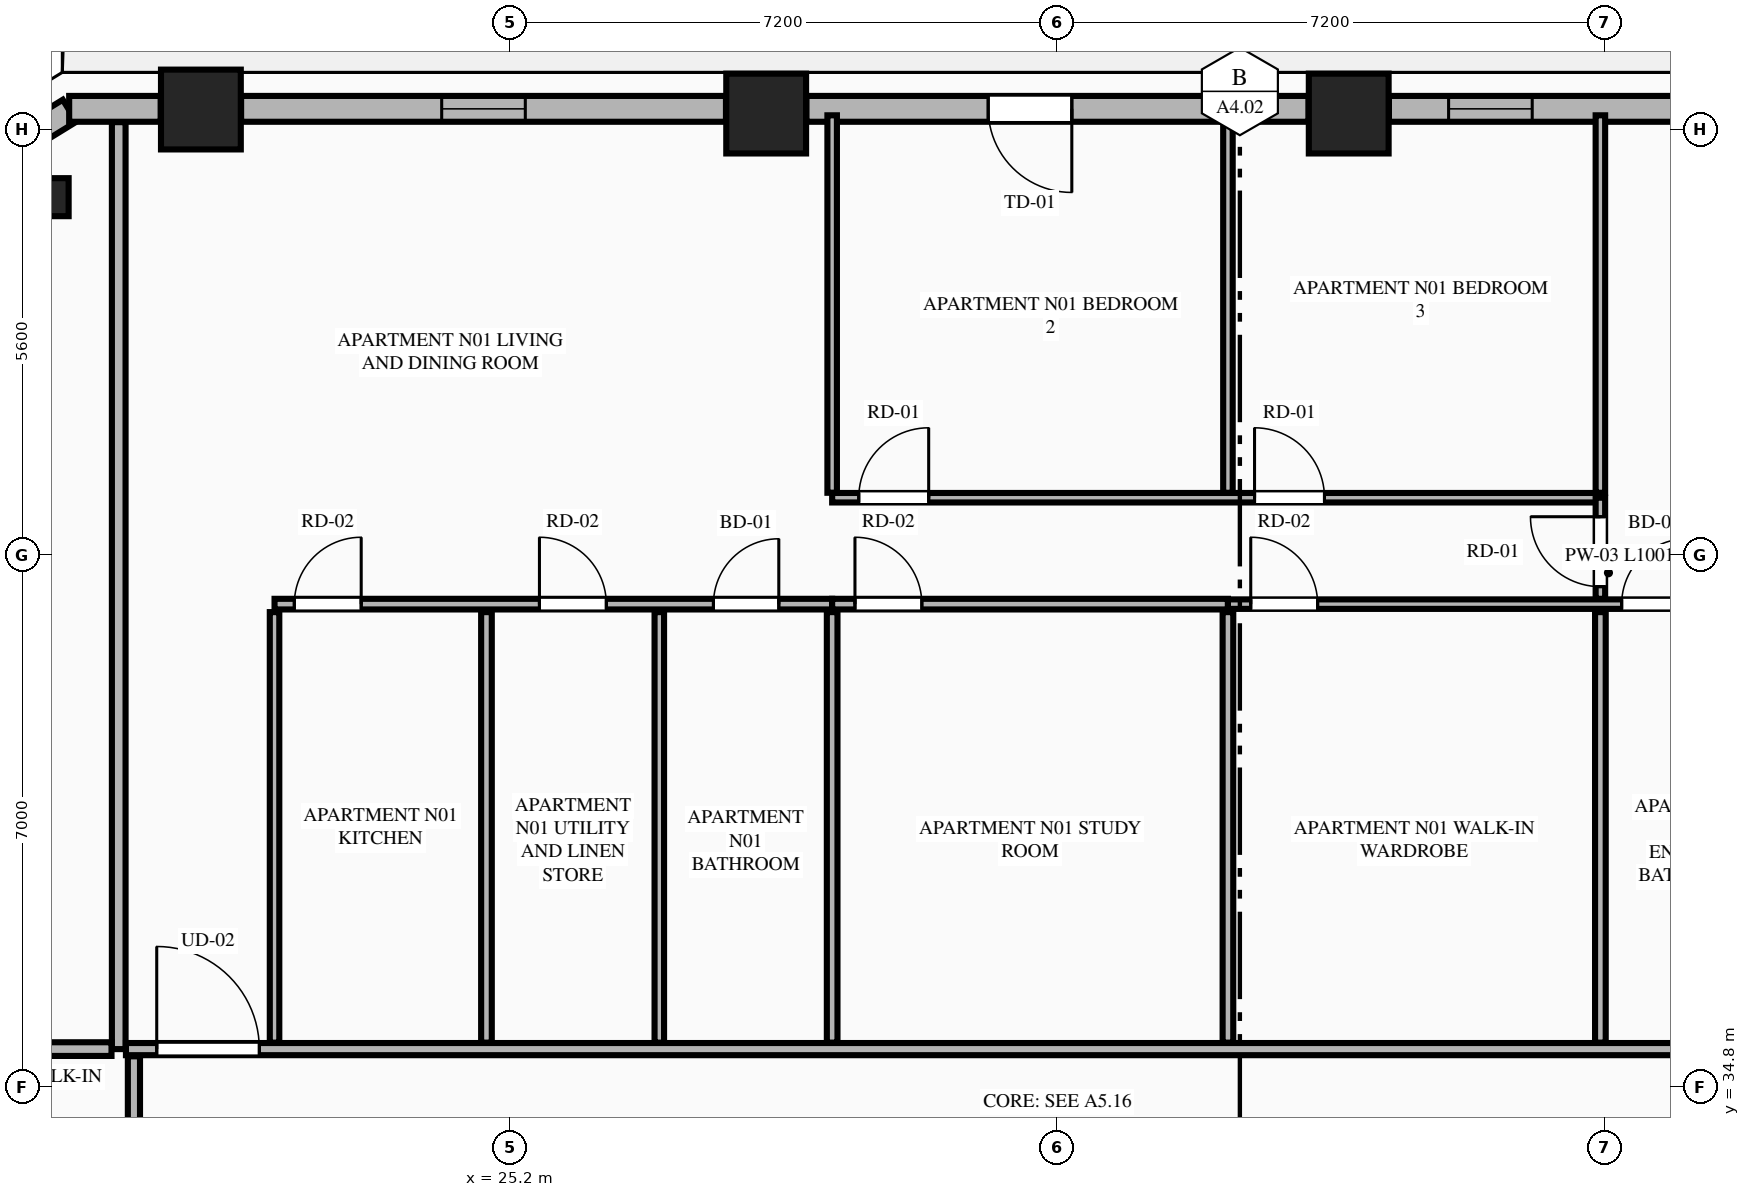
"""IFC4 building model, lengths in metres.
Left out: names, types, materials, properties, quantities, classifications, styles, units other than length and angle.
Written with IfcOpenShell. Run it as: python <this file> out.ifc"""

import sys

from ifc_helpers import new_model, si_unit, direction, frame, frame_2d, origin, origin_2d, place, context, subcontext, project, spatial, rectangle, extrude, element, fill, save


model = new_model("IFC4")
c1 = context("Model", 3, precision=1e-05, world=origin(), true_north=direction((0.0, 1.0)))
c2 = subcontext(c1, "Body", "Model", "MODEL_VIEW")
j1 = project(units=[si_unit("LENGTHUNIT", "METRE"), si_unit("PLANEANGLEUNIT", "RADIAN")], contexts=[c1])
p1 = place(None, origin())
s1 = spatial("IfcSite", under=j1, at=p1, CompositionType="ELEMENT")
p2 = place(p1, origin())
s2 = spatial("IfcBuilding", under=s1, at=p2, CompositionType="ELEMENT")
p3 = place(p2, frame((0.0, 0.0, 130.35)))
s3 = spatial("IfcBuildingStorey", under=s2, at=p3, CompositionType="ELEMENT", Elevation=130.35)
for number, where, z_axis, x_axis in (
    (1, (36.232, 47.608, 0.0), (0.0, 0.0, 1.0), (1.0, 0.0, 0.0)),
    (2, (28.568, 47.608, 0.0), (0.0, 0.0, 1.0), (1.0, 0.0, 0.0)),
    (3, (21.131, 47.661, 0.0), (0.0, 0.0, 1.0), (1.0, 0.0, 0.0)),
):
    element("IfcColumn", number, at=place(p3, frame(where, z_axis=z_axis, x_axis=x_axis)), inside=s3, PredefinedType="COLUMN", context=c2, shape_type="SweptSolid", body=[
        extrude(rectangle(XDim=1.05, YDim=1.05, at=origin_2d()), origin(), (0.0, 0.0, 1.0), 3.55),
    ])
p4 = place(p3, frame((19.141, 46.508, 0.0), z_axis=(0.0, 0.0, 1.0), x_axis=(-0.865160173452, -0.501495637342, 0.0)))
e4 = element("IfcColumn", 4, at=p4, inside=s3, PredefinedType="PILASTER", context=c2, shape_type="SweptSolid", body=[
    extrude(rectangle(XDim=0.5, YDim=0.35, at=origin_2d()), origin(), (0.0, 0.0, 1.0), 3.55),
])
p5 = place(p3, frame((19.403, 47.645, 0.0), z_axis=(0.0, 0.0, 1.0), x_axis=(-0.851798915137, -0.523868884523, 0.0)))
e5 = element("IfcWall", 5, at=p5, inside=s3, PredefinedType="STANDARD", context=c2, shape_type="SweptSolid", body=[
    extrude(rectangle(XDim=1.848, YDim=0.34, at=frame_2d((0.924, 0.0))), origin(), (0.0, 0.0, 1.0), 3.34),
])
p6 = place(p3, frame((43.14, 47.67, 0.0), z_axis=(0.0, 0.0, 1.0), x_axis=(-1.0, 0.0, 0.0)))
e6 = element("IfcWall", 6, at=p6, inside=s3, PredefinedType="STANDARD", context=c2, shape_type="SweptSolid", body=[
    extrude(rectangle(XDim=6.379, YDim=0.34, at=frame_2d((3.189, 0.0))), origin(), (0.0, 0.0, 1.0), 2.797),
])
p7 = place(p6, frame((1.192, 0.0, 0.75)))
e7 = element("IfcOpeningElement", 7, at=p7, cuts=e6, PredefinedType="OPENING", context=c2, shape_type="SweptSolid", body=[
    extrude(rectangle(XDim=1.1, YDim=1.897, at=frame_2d((0.55, 0.948))), frame((0.0, 0.18, 0.0), z_axis=(0.0, -1.0, 0.0), x_axis=(1.0, 0.0, 0.0)), (0.0, 0.0, 1.0), 0.36),
])
p8 = place(p6, frame((4.494, 0.0, 0.75)))
e8 = element("IfcOpeningElement", 8, at=p8, cuts=e6, PredefinedType="OPENING", context=c2, shape_type="SweptSolid", body=[
    extrude(rectangle(XDim=1.1, YDim=1.897, at=frame_2d((0.55, 0.948))), frame((0.0, 0.18, 0.0), z_axis=(0.0, -1.0, 0.0), x_axis=(1.0, 0.0, 0.0)), (0.0, 0.0, 1.0), 0.36),
])
p9 = place(p3, frame((35.703, 47.67, 0.0), z_axis=(0.0, 0.0, 1.0), x_axis=(-1.0, 0.0, 0.0)))
e9 = element("IfcWall", 9, at=p9, inside=s3, PredefinedType="STANDARD", context=c2, shape_type="SweptSolid", body=[
    extrude(rectangle(XDim=6.606, YDim=0.34, at=frame_2d((3.303, 0.0))), origin(), (0.0, 0.0, 1.0), 2.797),
])
p10 = place(p9, frame((3.114, 0.0, 0.0)))
e10 = element("IfcOpeningElement", 10, at=p10, cuts=e9, PredefinedType="OPENING", context=c2, shape_type="SweptSolid", body=[
    extrude(rectangle(XDim=1.1, YDim=2.25, at=frame_2d((0.55, 1.125))), frame((0.0, 0.18, 0.0), z_axis=(0.0, -1.0, 0.0), x_axis=(1.0, 0.0, 0.0)), (0.0, 0.0, 1.0), 0.36),
])
p11 = place(p3, frame((28.039, 47.67, 0.0), z_axis=(0.0, 0.0, 1.0), x_axis=(-1.0, 0.0, 0.0)))
e11 = element("IfcWall", 11, at=p11, inside=s3, PredefinedType="STANDARD", context=c2, shape_type="SweptSolid", body=[
    extrude(rectangle(XDim=6.379, YDim=0.34, at=frame_2d((3.189, 0.0))), origin(), (0.0, 0.0, 1.0), 2.797),
])
p12 = place(p11, frame((2.64, 0.0, 0.75)))
e12 = element("IfcOpeningElement", 12, at=p12, cuts=e11, PredefinedType="OPENING", context=c2, shape_type="SweptSolid", body=[
    extrude(rectangle(XDim=1.1, YDim=1.897, at=frame_2d((0.55, 0.948))), frame((0.0, 0.18, 0.0), z_axis=(0.0, -1.0, 0.0), x_axis=(1.0, 0.0, 0.0)), (0.0, 0.0, 1.0), 0.36),
])
p13 = place(p3, frame((20.602, 47.67, 0.0), z_axis=(0.0, 0.0, 1.0), x_axis=(-1.0, 0.0, 0.0)))
e13 = element("IfcWall", 13, at=p13, inside=s3, PredefinedType="STANDARD", context=c2, shape_type="SweptSolid", body=[
    extrude(rectangle(XDim=1.204, YDim=0.34, at=frame_2d((0.602, 0.0))), origin(), (0.0, 0.0, 1.0), 3.34),
])
p14 = place(p3, frame((20.05, 35.3, 0.0), z_axis=(0.0, 0.0, 1.0), x_axis=(0.0, 1.0, 0.0)))
e14 = element("IfcWall", 14, at=p14, inside=s3, PredefinedType="PARTITIONING", context=c2, shape_type="SweptSolid", body=[
    extrude(rectangle(XDim=12.195, YDim=0.18, at=frame_2d((6.098, 0.0))), origin(), (0.0, 0.0, 1.0), 3.34),
])
p15 = place(p3, frame((20.145, 35.3, 0.0), z_axis=(0.0, 0.0, 1.0), x_axis=(1.0, 0.0, 0.0)))
e15 = element("IfcWall", 15, at=p15, inside=s3, PredefinedType="PARTITIONING", context=c2, shape_type="SweptSolid", body=[
    extrude(rectangle(XDim=24.51, YDim=0.16, at=frame_2d((12.255, 0.0))), origin(), (0.0, 0.0, 1.0), 3.34),
])
p16 = place(p15, frame((0.405, 0.0, 0.0)))
e16 = element("IfcOpeningElement", 16, at=p16, cuts=e15, PredefinedType="OPENING", context=c2, shape_type="SweptSolid", body=[
    extrude(rectangle(XDim=1.35, YDim=2.35, at=frame_2d((0.675, 1.175))), frame((0.0, 0.09, 0.0), z_axis=(0.0, -1.0, 0.0), x_axis=(1.0, 0.0, 0.0)), (0.0, 0.0, 1.0), 0.18),
])
p17 = place(p3, frame((22.1, 35.385, 0.0), z_axis=(0.0, 0.0, 1.0), x_axis=(0.0, 1.0, 0.0)))
e17 = element("IfcWall", 17, at=p17, inside=s3, PredefinedType="PARTITIONING", context=c2, shape_type="SweptSolid", body=[
    extrude(rectangle(XDim=5.664, YDim=0.125, at=frame_2d((2.832, 0.0))), origin(), (0.0, 0.0, 1.0), 2.722),
])
p18 = place(p3, frame((22.1, 41.154, 0.0), z_axis=(0.0, 0.0, 1.0), x_axis=(1.0, 0.0, 0.0)))
e18 = element("IfcWall", 18, at=p18, inside=s3, PredefinedType="PLUMBINGWALL", context=c2, shape_type="SweptSolid", body=[
    extrude(rectangle(XDim=7.336, YDim=0.14, at=frame_2d((3.668, 0.0))), origin(), (0.0, 0.0, 1.0), 3.34),
])
p19 = place(p18, frame((5.774, 0.0, 0.0)))
e19 = element("IfcOpeningElement", 19, at=p19, cuts=e18, PredefinedType="OPENING", context=c2, shape_type="SweptSolid", body=[
    extrude(rectangle(XDim=0.86, YDim=2.1, at=frame_2d((0.43, 1.05))), frame((0.0, 0.08, 0.0), z_axis=(0.0, -1.0, 0.0), x_axis=(1.0, 0.0, 0.0)), (0.0, 0.0, 1.0), 0.16),
])
p20 = place(p18, frame((0.26, 0.0, 0.0)))
e20 = element("IfcOpeningElement", 20, at=p20, cuts=e18, PredefinedType="OPENING", context=c2, shape_type="SweptSolid", body=[
    extrude(rectangle(XDim=0.88, YDim=2.15, at=frame_2d((0.44, 1.075))), frame((0.0, 0.08, 0.0), z_axis=(0.0, -1.0, 0.0), x_axis=(1.0, 0.0, 0.0)), (0.0, 0.0, 1.0), 0.16),
])
p21 = place(p18, frame((3.485, 0.0, 0.0)))
e21 = element("IfcOpeningElement", 21, at=p21, cuts=e18, PredefinedType="OPENING", context=c2, shape_type="SweptSolid", body=[
    extrude(rectangle(XDim=0.88, YDim=2.15, at=frame_2d((0.44, 1.075))), frame((0.0, 0.08, 0.0), z_axis=(0.0, -1.0, 0.0), x_axis=(1.0, 0.0, 0.0)), (0.0, 0.0, 1.0), 0.16),
])
p22 = place(p3, frame((29.436, 41.154, 0.0), z_axis=(0.0, 0.0, 1.0), x_axis=(1.0, 0.0, 0.0)))
e22 = element("IfcWall", 22, at=p22, inside=s3, PredefinedType="PLUMBINGWALL", context=c2, shape_type="SweptSolid", body=[
    extrude(rectangle(XDim=5.207, YDim=0.14, at=frame_2d((2.604, 0.0))), origin(), (0.0, 0.0, 1.0), 3.34),
])
p23 = place(p22, frame((0.3, 0.0, 0.0)))
e23 = element("IfcOpeningElement", 23, at=p23, cuts=e22, PredefinedType="OPENING", context=c2, shape_type="SweptSolid", body=[
    extrude(rectangle(XDim=0.88, YDim=2.15, at=frame_2d((0.44, 1.075))), frame((0.0, 0.08, 0.0), z_axis=(0.0, -1.0, 0.0), x_axis=(1.0, 0.0, 0.0)), (0.0, 0.0, 1.0), 0.16),
])
p24 = place(p3, frame((34.643, 41.154, 0.0), z_axis=(0.0, 0.0, 1.0), x_axis=(1.0, 0.0, 0.0)))
e24 = element("IfcWall", 24, at=p24, inside=s3, PredefinedType="PARTITIONING", context=c2, shape_type="SweptSolid", body=[
    extrude(rectangle(XDim=10.012, YDim=0.125, at=frame_2d((5.006, 0.0))), origin(), (0.0, 0.0, 1.0), 3.34),
])
p25 = place(p24, frame((5.18, 0.0, 0.0)))
e25 = element("IfcOpeningElement", 25, at=p25, cuts=e24, PredefinedType="OPENING", context=c2, shape_type="SweptSolid", body=[
    extrude(rectangle(XDim=0.86, YDim=2.1, at=frame_2d((0.43, 1.05))), frame((0.0, 0.073, 0.0), z_axis=(0.0, -1.0, 0.0), x_axis=(1.0, 0.0, 0.0)), (0.0, 0.0, 1.0), 0.145),
])
p26 = place(p24, frame((7.604, 0.0, 0.0)))
e26 = element("IfcOpeningElement", 26, at=p26, cuts=e24, PredefinedType="OPENING", context=c2, shape_type="SweptSolid", body=[
    extrude(rectangle(XDim=0.88, YDim=2.15, at=frame_2d((0.44, 1.075))), frame((0.0, 0.073, 0.0), z_axis=(0.0, -1.0, 0.0), x_axis=(1.0, 0.0, 0.0)), (0.0, 0.0, 1.0), 0.145),
])
p27 = place(p24, frame((0.3, 0.0, 0.0)))
e27 = element("IfcOpeningElement", 27, at=p27, cuts=e24, PredefinedType="OPENING", context=c2, shape_type="SweptSolid", body=[
    extrude(rectangle(XDim=0.88, YDim=2.15, at=frame_2d((0.44, 1.075))), frame((0.0, 0.073, 0.0), z_axis=(0.0, -1.0, 0.0), x_axis=(1.0, 0.0, 0.0)), (0.0, 0.0, 1.0), 0.145),
])
p28 = place(p3, frame((24.888, 35.385, 0.0), z_axis=(0.0, 0.0, 1.0), x_axis=(0.0, 1.0, 0.0)))
e28 = element("IfcWall", 28, at=p28, inside=s3, PredefinedType="PLUMBINGWALL", context=c2, shape_type="SweptSolid", body=[
    extrude(rectangle(XDim=5.664, YDim=0.14, at=frame_2d((2.832, 0.0))), origin(), (0.0, 0.0, 1.0), 3.34),
])
p29 = place(p3, frame((27.162, 35.385, 0.0), z_axis=(0.0, 0.0, 1.0), x_axis=(0.0, 1.0, 0.0)))
e29 = element("IfcWall", 29, at=p29, inside=s3, PredefinedType="PARTITIONING", context=c2, shape_type="SweptSolid", body=[
    extrude(rectangle(XDim=5.664, YDim=0.125, at=frame_2d((2.832, 0.0))), origin(), (0.0, 0.0, 1.0), 3.34),
])
p30 = place(p3, frame((29.436, 42.619, 0.0), z_axis=(0.0, 0.0, 1.0), x_axis=(0.0, 1.0, 0.0)))
e30 = element("IfcWall", 30, at=p30, inside=s3, PredefinedType="PARTITIONING", context=c2, shape_type="SweptSolid", body=[
    extrude(rectangle(XDim=4.966, YDim=0.125, at=frame_2d((2.483, 0.0))), origin(), (0.0, 0.0, 1.0), 3.34),
])
p31 = place(p3, frame((29.436, 42.554, 0.0), z_axis=(0.0, 0.0, 1.0), x_axis=(1.0, 0.0, 0.0)))
e31 = element("IfcWall", 31, at=p31, inside=s3, PredefinedType="PARTITIONING", context=c2, shape_type="SweptSolid", body=[
    extrude(rectangle(XDim=10.107, YDim=0.125, at=frame_2d((5.053, 0.0))), origin(), (0.0, 0.0, 1.0), 2.975),
])
p32 = place(p31, frame((0.35, 0.0, 0.0)))
e32 = element("IfcOpeningElement", 32, at=p32, cuts=e31, PredefinedType="OPENING", context=c2, shape_type="SweptSolid", body=[
    extrude(rectangle(XDim=0.92, YDim=2.15, at=frame_2d((0.46, 1.075))), frame((0.0, 0.073, 0.0), z_axis=(0.0, -1.0, 0.0), x_axis=(1.0, 0.0, 0.0)), (0.0, 0.0, 1.0), 0.145),
])
p33 = place(p31, frame((5.557, 0.0, 0.0)))
e33 = element("IfcOpeningElement", 33, at=p33, cuts=e31, PredefinedType="OPENING", context=c2, shape_type="SweptSolid", body=[
    extrude(rectangle(XDim=0.92, YDim=2.15, at=frame_2d((0.46, 1.075))), frame((0.0, 0.073, 0.0), z_axis=(0.0, -1.0, 0.0), x_axis=(1.0, 0.0, 0.0)), (0.0, 0.0, 1.0), 0.145),
])
p34 = place(p3, frame((39.543, 41.224, 0.0), z_axis=(0.0, 0.0, 1.0), x_axis=(0.0, 1.0, 0.0)))
e34 = element("IfcWall", 34, at=p34, inside=s3, PredefinedType="PARTITIONING", context=c2, shape_type="SweptSolid", body=[
    extrude(rectangle(XDim=1.33, YDim=0.125, at=frame_2d((0.665, 0.0))), origin(), (0.0, 0.0, 1.0), 3.34),
])
p35 = place(p34, frame((0.16, 0.0, 0.0)))
e35 = element("IfcOpeningElement", 35, at=p35, cuts=e34, PredefinedType="OPENING", context=c2, shape_type="SweptSolid", body=[
    extrude(rectangle(XDim=0.92, YDim=2.15, at=frame_2d((0.46, 1.075))), frame((0.0, 0.073, 0.0), z_axis=(0.0, -1.0, 0.0), x_axis=(1.0, 0.0, 0.0)), (0.0, 0.0, 1.0), 0.145),
])
for number, where, z_axis, x_axis in (
    (36, (29.436, 35.385, 0.0), (0.0, 0.0, 1.0), (0.0, 1.0, 0.0)),
    (37, (34.643, 35.385, 0.0), (0.0, 0.0, 1.0), (0.0, 1.0, 0.0)),
):
    element("IfcWall", number, at=place(p3, frame(where, z_axis=z_axis, x_axis=x_axis)), inside=s3, PredefinedType="PLUMBINGWALL", context=c2, shape_type="SweptSolid", body=[
        extrude(rectangle(XDim=5.664, YDim=0.14, at=frame_2d((2.832, 0.0))), origin(), (0.0, 0.0, 1.0), 3.34),
    ])
for number, where, z_axis, x_axis in (
    (38, (34.643, 42.619, 0.0), (0.0, 0.0, 1.0), (0.0, 1.0, 0.0)),
    (39, (39.543, 42.619, 0.0), (0.0, 0.0, 1.0), (0.0, 1.0, 0.0)),
):
    element("IfcWall", number, at=place(p3, frame(where, z_axis=z_axis, x_axis=x_axis)), inside=s3, PredefinedType="PARTITIONING", context=c2, shape_type="SweptSolid", body=[
        extrude(rectangle(XDim=4.966, YDim=0.125, at=frame_2d((2.483, 0.0))), origin(), (0.0, 0.0, 1.0), 3.34),
    ])
p36 = place(p3, frame((39.543, 35.385, 0.0), z_axis=(0.0, 0.0, 1.0), x_axis=(0.0, 1.0, 0.0)))
e40 = element("IfcWall", 40, at=p36, inside=s3, PredefinedType="PLUMBINGWALL", context=c2, shape_type="SweptSolid", body=[
    extrude(rectangle(XDim=5.664, YDim=0.14, at=frame_2d((2.832, 0.0))), origin(), (0.0, 0.0, 1.0), 3.34),
])
p37 = place(p3, frame((12.286, 35.3, 0.0), z_axis=(0.0, 0.0, 1.0), x_axis=(1.0, 0.0, 0.0)))
e41 = element("IfcWall", 41, at=p37, inside=s3, PredefinedType="PARTITIONING", context=c2, shape_type="SweptSolid", body=[
    extrude(rectangle(XDim=7.669, YDim=0.18, at=frame_2d((3.834, 0.0))), origin(), (0.0, 0.0, 1.0), 3.34),
])
p38 = place(p3, frame((20.25, 16.595, 0.0), z_axis=(0.0, 0.0, 1.0), x_axis=(0.0, 1.0, 0.0)))
e42 = element("IfcWall", 42, at=p38, inside=s3, PredefinedType="PARTITIONING", context=c2, shape_type="SweptSolid", body=[
    extrude(rectangle(XDim=18.61, YDim=0.16, at=frame_2d((9.305, 0.0))), origin(), (0.0, 0.0, 1.0), 3.34),
])
p39 = place(p38, frame((0.45, 0.0, 0.0)))
e43 = element("IfcOpeningElement", 43, at=p39, cuts=e42, PredefinedType="OPENING", context=c2, shape_type="SweptSolid", body=[
    extrude(rectangle(XDim=1.02, YDim=2.25, at=frame_2d((0.51, 1.125))), frame((0.0, 0.09, 0.0), z_axis=(0.0, -1.0, 0.0), x_axis=(1.0, 0.0, 0.0)), (0.0, 0.0, 1.0), 0.18),
])
p40 = place(p10, origin())
e44 = element("IfcDoor", 44, at=p40, inside=s3, OperationType="SINGLE_SWING_LEFT", PredefinedType="DOOR", context=c2, shape_type="SweptSolid", body=[
    extrude(rectangle(XDim=1.1, YDim=2.25, at=frame_2d((0.55, 1.125))), frame((0.0, 0.025, 0.0), z_axis=(0.0, -1.0, 0.0), x_axis=(1.0, 0.0, 0.0)), (0.0, 0.0, 1.0), 0.05),
])
fill(e10, e44)
p41 = place(p12, origin())
e45 = element("IfcWindow", 45, at=p41, inside=s3, PartitioningType="SINGLE_PANEL", PredefinedType="WINDOW", context=c2, shape_type="SweptSolid", body=[
    extrude(rectangle(XDim=1.1, YDim=1.897, at=frame_2d((0.55, 0.948))), frame((0.0, 0.03, 0.0), z_axis=(0.0, -1.0, 0.0), x_axis=(1.0, 0.0, 0.0)), (0.0, 0.0, 1.0), 0.06),
])
fill(e12, e45)
p42 = place(p19, origin())
e46 = element("IfcDoor", 46, at=p42, inside=s3, OperationType="SINGLE_SWING_RIGHT", PredefinedType="DOOR", context=c2, shape_type="SweptSolid", body=[
    extrude(rectangle(XDim=0.86, YDim=2.1, at=frame_2d((0.43, 1.05))), frame((0.0, 0.025, 0.0), z_axis=(0.0, -1.0, 0.0), x_axis=(1.0, 0.0, 0.0)), (0.0, 0.0, 1.0), 0.05),
])
fill(e19, e46)
p43 = place(p25, origin())
e47 = element("IfcDoor", 47, at=p43, inside=s3, OperationType="SINGLE_SWING_RIGHT", PredefinedType="DOOR", context=c2, shape_type="SweptSolid", body=[
    extrude(rectangle(XDim=0.86, YDim=2.1, at=frame_2d((0.43, 1.05))), frame((0.0, 0.025, 0.0), z_axis=(0.0, -1.0, 0.0), x_axis=(1.0, 0.0, 0.0)), (0.0, 0.0, 1.0), 0.05),
])
fill(e25, e47)
p44 = place(p16, origin())
e48 = element("IfcDoor", 48, at=p44, inside=s3, OperationType="SINGLE_SWING_LEFT", PredefinedType="DOOR", context=c2, shape_type="SweptSolid", body=[
    extrude(rectangle(XDim=1.35, YDim=2.35, at=frame_2d((0.675, 1.175))), frame((0.0, 0.025, 0.0), z_axis=(0.0, -1.0, 0.0), x_axis=(1.0, 0.0, 0.0)), (0.0, 0.0, 1.0), 0.05),
])
fill(e16, e48)
p45 = place(p20, origin())
e49 = element("IfcDoor", 49, at=p45, inside=s3, OperationType="SINGLE_SWING_RIGHT", PredefinedType="DOOR", context=c2, shape_type="SweptSolid", body=[
    extrude(rectangle(XDim=0.88, YDim=2.15, at=frame_2d((0.44, 1.075))), frame((0.0, 0.025, 0.0), z_axis=(0.0, -1.0, 0.0), x_axis=(1.0, 0.0, 0.0)), (0.0, 0.0, 1.0), 0.05),
])
fill(e20, e49)
p46 = place(p21, origin())
e50 = element("IfcDoor", 50, at=p46, inside=s3, OperationType="SINGLE_SWING_LEFT", PredefinedType="DOOR", context=c2, shape_type="SweptSolid", body=[
    extrude(rectangle(XDim=0.88, YDim=2.15, at=frame_2d((0.44, 1.075))), frame((0.0, 0.025, 0.0), z_axis=(0.0, -1.0, 0.0), x_axis=(1.0, 0.0, 0.0)), (0.0, 0.0, 1.0), 0.05),
])
fill(e21, e50)
p47 = place(p23, origin())
e51 = element("IfcDoor", 51, at=p47, inside=s3, OperationType="SINGLE_SWING_LEFT", PredefinedType="DOOR", context=c2, shape_type="SweptSolid", body=[
    extrude(rectangle(XDim=0.88, YDim=2.15, at=frame_2d((0.44, 1.075))), frame((0.0, 0.025, 0.0), z_axis=(0.0, -1.0, 0.0), x_axis=(1.0, 0.0, 0.0)), (0.0, 0.0, 1.0), 0.05),
])
fill(e23, e51)
p48 = place(p32, origin())
e52 = element("IfcDoor", 52, at=p48, inside=s3, OperationType="SINGLE_SWING_RIGHT", PredefinedType="DOOR", context=c2, shape_type="SweptSolid", body=[
    extrude(rectangle(XDim=0.92, YDim=2.15, at=frame_2d((0.46, 1.075))), frame((0.0, 0.025, 0.0), z_axis=(0.0, -1.0, 0.0), x_axis=(1.0, 0.0, 0.0)), (0.0, 0.0, 1.0), 0.05),
])
fill(e32, e52)
p49 = place(p33, origin())
e53 = element("IfcDoor", 53, at=p49, inside=s3, OperationType="SINGLE_SWING_LEFT", PredefinedType="DOOR", context=c2, shape_type="SweptSolid", body=[
    extrude(rectangle(XDim=0.92, YDim=2.15, at=frame_2d((0.46, 1.075))), frame((0.0, 0.025, 0.0), z_axis=(0.0, -1.0, 0.0), x_axis=(1.0, 0.0, 0.0)), (0.0, 0.0, 1.0), 0.05),
])
fill(e33, e53)
p50 = place(p35, origin())
e54 = element("IfcDoor", 54, at=p50, inside=s3, OperationType="SINGLE_SWING_RIGHT", PredefinedType="DOOR", context=c2, shape_type="SweptSolid", body=[
    extrude(rectangle(XDim=0.92, YDim=2.15, at=frame_2d((0.46, 1.075))), frame((0.0, 0.025, 0.0), z_axis=(0.0, -1.0, 0.0), x_axis=(1.0, 0.0, 0.0)), (0.0, 0.0, 1.0), 0.05),
])
fill(e35, e54)
p51 = place(p27, origin())
e55 = element("IfcDoor", 55, at=p51, inside=s3, OperationType="SINGLE_SWING_LEFT", PredefinedType="DOOR", context=c2, shape_type="SweptSolid", body=[
    extrude(rectangle(XDim=0.88, YDim=2.15, at=frame_2d((0.44, 1.075))), frame((0.0, 0.025, 0.0), z_axis=(0.0, -1.0, 0.0), x_axis=(1.0, 0.0, 0.0)), (0.0, 0.0, 1.0), 0.05),
])
fill(e27, e55)
p52 = place(p8, origin())
e56 = element("IfcWindow", 56, at=p52, inside=s3, PartitioningType="SINGLE_PANEL", PredefinedType="WINDOW", context=c2, shape_type="SweptSolid", body=[
    extrude(rectangle(XDim=1.1, YDim=1.897, at=frame_2d((0.55, 0.948))), frame((0.0, 0.03, 0.0), z_axis=(0.0, -1.0, 0.0), x_axis=(1.0, 0.0, 0.0)), (0.0, 0.0, 1.0), 0.06),
])
fill(e8, e56)
save(model, sys.argv[1])
